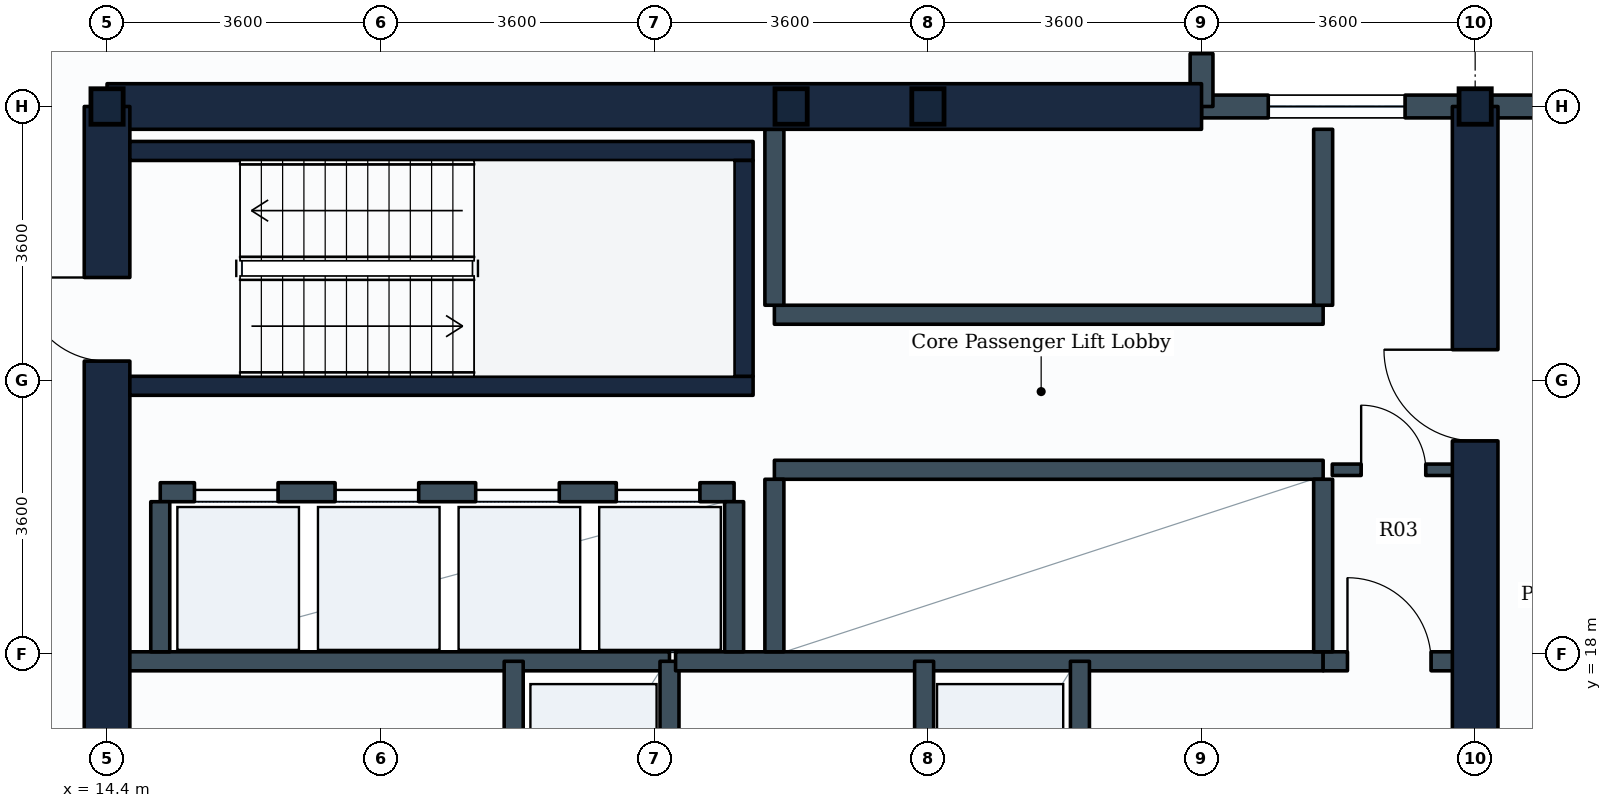
"""IFC4 building model, lengths in metres.
Left out: names, types, materials, properties, quantities, classifications, styles, units other than length and angle.
Written with IfcOpenShell. Run it as: python <this file> out.ifc"""

import sys

from ifc_helpers import new_model, si_unit, direction, frame, frame_2d, origin, origin_2d, place, context, subcontext, project, spatial, rectangle, i_section, extrude, element, fill, save


model = new_model("IFC4")
c1 = context("Model", 3, precision=1e-05, world=origin(), true_north=direction((0.0, 1.0)))
c2 = subcontext(c1, "Body", "Model", "MODEL_VIEW")
j1 = project(units=[si_unit("LENGTHUNIT", "METRE"), si_unit("PLANEANGLEUNIT", "RADIAN")], contexts=[c1])
p1 = place(None, origin())
s1 = spatial("IfcSite", under=j1, at=p1, CompositionType="ELEMENT")
p2 = place(p1, origin())
s2 = spatial("IfcBuilding", under=s1, at=p2, CompositionType="ELEMENT")
p3 = place(p2, frame((0.0, 0.0, 70.8)))
s3 = spatial("IfcBuildingStorey", under=s2, at=p3, CompositionType="ELEMENT", Elevation=70.8)
for number, where, z_axis, x_axis in (
    (1, (14.4, 25.2, 0.0), (0.0, 0.0, 1.0), (1.0, 0.0, 0.0)),
    (2, (23.4, 25.2, 0.0), (0.0, 0.0, 1.0), (1.0, 0.0, 0.0)),
    (3, (25.2, 25.2, 0.0), (0.0, 0.0, 1.0), (1.0, 0.0, 0.0)),
    (4, (32.4, 25.2, 0.0), (0.0, 0.0, 1.0), (1.0, 0.0, 0.0)),
):
    element("IfcColumn", number, at=place(p3, frame(where, z_axis=z_axis, x_axis=x_axis)), inside=s3, PredefinedType="COLUMN", context=c2, shape_type="SweptSolid", body=[
        extrude(i_section(OverallWidth=0.424, OverallDepth=0.467, WebThickness=0.033, FlangeThickness=0.053, FilletRadius=0.015, at=origin_2d()), origin(), (0.0, 0.0, 1.0), 3.9),
    ])
p4 = place(p3, frame((32.4, 25.2, 0.0), z_axis=(0.0, 0.0, 1.0), x_axis=(1.0, 0.0, 0.0)))
e5 = element("IfcWall", 5, at=p4, inside=s3, PredefinedType="STANDARD", context=c2, shape_type="SweptSolid", body=[
    extrude(rectangle(XDim=3.6, YDim=0.3, at=frame_2d((1.8, 0.0))), origin(), (0.0, 0.0, 1.0), 2.93),
])
p5 = place(p3, frame((28.8, 25.2, 0.0), z_axis=(0.0, 0.0, 1.0), x_axis=(1.0, 0.0, 0.0)))
e6 = element("IfcWall", 6, at=p5, inside=s3, PredefinedType="STANDARD", context=c2, shape_type="SweptSolid", body=[
    extrude(rectangle(XDim=3.6, YDim=0.3, at=frame_2d((1.8, 0.0))), origin(), (0.0, 0.0, 1.0), 3.565),
])
p6 = place(p5, frame((0.878, 0.0, 0.85)))
e7 = element("IfcOpeningElement", 7, at=p6, cuts=e6, PredefinedType="OPENING", context=c2, shape_type="SweptSolid", body=[
    extrude(rectangle(XDim=1.8, YDim=1.35, at=frame_2d((0.9, 0.675))), frame((0.0, 0.16, 0.0), z_axis=(0.0, -1.0, 0.0), x_axis=(1.0, 0.0, 0.0)), (0.0, 0.0, 1.0), 0.32),
])
p7 = place(p3, frame((28.8, 25.2, 0.0), z_axis=(0.0, 0.0, 1.0), x_axis=(0.0, 1.0, 0.0)))
e8 = element("IfcWall", 8, at=p7, inside=s3, PredefinedType="STANDARD", context=c2, shape_type="SweptSolid", body=[
    extrude(rectangle(XDim=3.6, YDim=0.3, at=frame_2d((1.8, 0.0))), origin(), (0.0, 0.0, 1.0), 3.07),
])
p8 = place(p7, frame((0.695, 0.0, 0.85)))
e9 = element("IfcOpeningElement", 9, at=p8, cuts=e8, PredefinedType="OPENING", context=c2, shape_type="SweptSolid", body=[
    extrude(rectangle(XDim=1.8, YDim=1.35, at=frame_2d((0.9, 0.675))), frame((0.0, 0.16, 0.0), z_axis=(0.0, -1.0, 0.0), x_axis=(1.0, 0.0, 0.0)), (0.0, 0.0, 1.0), 0.32),
])
p9 = place(p3, frame((14.4, 25.2, 0.0), z_axis=(0.0, 0.0, 1.0), x_axis=(1.0, 0.0, 0.0)))
e10 = element("IfcWall", 10, at=p9, inside=s3, PredefinedType="SHEAR", context=c2, shape_type="SweptSolid", body=[
    extrude(rectangle(XDim=14.4, YDim=0.6, at=frame_2d((7.2, 0.0))), origin(), (0.0, 0.0, 1.0), 3.58),
])
p10 = place(p3, frame((14.4, 10.8, 0.0), z_axis=(0.0, 0.0, 1.0), x_axis=(0.0, 1.0, 0.0)))
e11 = element("IfcWall", 11, at=p10, inside=s3, PredefinedType="SHEAR", context=c2, shape_type="SweptSolid", body=[
    extrude(rectangle(XDim=14.4, YDim=0.6, at=frame_2d((7.2, 0.0))), origin(), (0.0, 0.0, 1.0), 3.58),
])
p11 = place(p10, frame((11.05, 0.0, 0.0)))
e12 = element("IfcOpeningElement", 12, at=p11, cuts=e11, PredefinedType="OPENING", context=c2, shape_type="SweptSolid", body=[
    extrude(rectangle(XDim=1.1, YDim=2.1, at=frame_2d((0.55, 1.05))), frame((0.0, 0.31, 0.0), z_axis=(0.0, -1.0, 0.0), x_axis=(1.0, 0.0, 0.0)), (0.0, 0.0, 1.0), 0.62),
])
p12 = place(p10, frame((4.9, 0.0, 0.0)))
e13 = element("IfcOpeningElement", 13, at=p12, cuts=e11, PredefinedType="OPENING", context=c2, shape_type="SweptSolid", body=[
    extrude(rectangle(XDim=1.2, YDim=2.1, at=frame_2d((0.6, 1.05))), frame((0.0, 0.31, 0.0), z_axis=(0.0, -1.0, 0.0), x_axis=(1.0, 0.0, 0.0)), (0.0, 0.0, 1.0), 0.62),
])
p13 = place(p3, frame((32.4, 10.8, 0.0), z_axis=(0.0, 0.0, 1.0), x_axis=(0.0, 1.0, 0.0)))
e14 = element("IfcWall", 14, at=p13, inside=s3, PredefinedType="SHEAR", context=c2, shape_type="SweptSolid", body=[
    extrude(rectangle(XDim=14.4, YDim=0.6, at=frame_2d((7.2, 0.0))), origin(), (0.0, 0.0, 1.0), 3.58),
])
p14 = place(p13, frame((4.35, 0.0, 0.0)))
e15 = element("IfcOpeningElement", 15, at=p14, cuts=e14, PredefinedType="OPENING", context=c2, shape_type="SweptSolid", body=[
    extrude(rectangle(XDim=1.2, YDim=2.1, at=frame_2d((0.6, 1.05))), frame((0.0, 0.31, 0.0), z_axis=(0.0, -1.0, 0.0), x_axis=(1.0, 0.0, 0.0)), (0.0, 0.0, 1.0), 0.62),
])
p15 = place(p13, frame((10.0, 0.0, 0.0)))
e16 = element("IfcOpeningElement", 16, at=p15, cuts=e14, PredefinedType="OPENING", context=c2, shape_type="SweptSolid", body=[
    extrude(rectangle(XDim=1.2, YDim=2.1, at=frame_2d((0.6, 1.05))), frame((0.0, 0.31, 0.0), z_axis=(0.0, -1.0, 0.0), x_axis=(1.0, 0.0, 0.0)), (0.0, 0.0, 1.0), 0.62),
])
for number, where, z_axis, x_axis in (
    (17, (14.7, 21.525, 0.0), (0.0, 0.0, 1.0), (1.0, 0.0, 0.0)),
    (18, (14.7, 24.615, 0.0), (0.0, 0.0, 1.0), (1.0, 0.0, 0.0)),
):
    element("IfcWall", number, at=place(p3, frame(where, z_axis=z_axis, x_axis=x_axis)), inside=s3, PredefinedType="SHEAR", context=c2, shape_type="SweptSolid", body=[
        extrude(rectangle(XDim=8.2, YDim=0.25, at=frame_2d((4.1, 0.0))), origin(), (0.0, 0.0, 1.0), 3.58),
    ])
p16 = place(p3, frame((22.775, 21.65, 0.0), z_axis=(0.0, 0.0, 1.0), x_axis=(0.0, 1.0, 0.0)))
e19 = element("IfcWall", 19, at=p16, inside=s3, PredefinedType="SHEAR", context=c2, shape_type="SweptSolid", body=[
    extrude(rectangle(XDim=2.84, YDim=0.25, at=frame_2d((1.42, 0.0))), origin(), (0.0, 0.0, 1.0), 3.58),
])
p17 = place(p3, frame((14.65, 17.9, 0.0), z_axis=(0.0, 0.0, 1.0), x_axis=(1.0, 0.0, 0.0)))
e20 = element("IfcWall", 20, at=p17, inside=s3, PredefinedType="PARTITIONING", context=c2, shape_type="SweptSolid", body=[
    extrude(rectangle(XDim=7.15, YDim=0.25, at=frame_2d((3.575, 0.0))), origin(), (0.0, 0.0, 1.0), 3.565),
])
p18 = place(p3, frame((19.75, 14.84, 0.0), z_axis=(0.0, 0.0, 1.0), x_axis=(0.0, 1.0, 0.0)))
e21 = element("IfcWall", 21, at=p18, inside=s3, PredefinedType="PARTITIONING", context=c2, shape_type="SweptSolid", body=[
    extrude(rectangle(XDim=3.06, YDim=0.25, at=frame_2d((1.53, 0.0))), origin(), (0.0, 0.0, 1.0), 3.565),
])
p19 = place(p18, frame((0.98, 0.0, 0.0)))
e22 = element("IfcOpeningElement", 22, at=p19, cuts=e21, PredefinedType="OPENING", context=c2, shape_type="SweptSolid", body=[
    extrude(rectangle(XDim=1.1, YDim=2.1, at=frame_2d((0.55, 1.05))), frame((0.0, 0.135, 0.0), z_axis=(0.0, -1.0, 0.0), x_axis=(1.0, 0.0, 0.0)), (0.0, 0.0, 1.0), 0.27),
])
p20 = place(p3, frame((21.8, 14.84, 0.0), z_axis=(0.0, 0.0, 1.0), x_axis=(0.0, 1.0, 0.0)))
e23 = element("IfcWall", 23, at=p20, inside=s3, PredefinedType="PARTITIONING", context=c2, shape_type="SweptSolid", body=[
    extrude(rectangle(XDim=3.06, YDim=0.25, at=frame_2d((1.53, 0.0))), origin(), (0.0, 0.0, 1.0), 3.565),
])
p21 = place(p3, frame((21.88, 17.9, 0.0), z_axis=(0.0, 0.0, 1.0), x_axis=(1.0, 0.0, 0.0)))
e24 = element("IfcWall", 24, at=p21, inside=s3, PredefinedType="PARTITIONING", context=c2, shape_type="SweptSolid", body=[
    extrude(rectangle(XDim=8.52, YDim=0.25, at=frame_2d((4.26, 0.0))), origin(), (0.0, 0.0, 1.0), 3.565),
])
p22 = place(p3, frame((30.4, 17.9, 0.0), z_axis=(0.0, 0.0, 1.0), x_axis=(1.0, 0.0, 0.0)))
e25 = element("IfcWall", 25, at=p22, inside=s3, PredefinedType="PARTITIONING", context=c2, shape_type="SweptSolid", body=[
    extrude(rectangle(XDim=1.75, YDim=0.25, at=frame_2d((0.875, 0.0))), origin(), (0.0, 0.0, 1.0), 3.565),
])
p23 = place(p22, frame((0.32, 0.0, 0.0)))
e26 = element("IfcOpeningElement", 26, at=p23, cuts=e25, PredefinedType="OPENING", context=c2, shape_type="SweptSolid", body=[
    extrude(rectangle(XDim=1.1, YDim=2.1, at=frame_2d((0.55, 1.05))), frame((0.0, 0.135, 0.0), z_axis=(0.0, -1.0, 0.0), x_axis=(1.0, 0.0, 0.0)), (0.0, 0.0, 1.0), 0.27),
])
p24 = place(p3, frame((25.15, 14.84, 0.0), z_axis=(0.0, 0.0, 1.0), x_axis=(0.0, 1.0, 0.0)))
e27 = element("IfcWall", 27, at=p24, inside=s3, PredefinedType="PARTITIONING", context=c2, shape_type="SweptSolid", body=[
    extrude(rectangle(XDim=3.06, YDim=0.25, at=frame_2d((1.53, 0.0))), origin(), (0.0, 0.0, 1.0), 3.565),
])
p25 = place(p3, frame((27.2, 14.84, 0.0), z_axis=(0.0, 0.0, 1.0), x_axis=(0.0, 1.0, 0.0)))
e28 = element("IfcWall", 28, at=p25, inside=s3, PredefinedType="PARTITIONING", context=c2, shape_type="SweptSolid", body=[
    extrude(rectangle(XDim=3.06, YDim=0.25, at=frame_2d((1.53, 0.0))), origin(), (0.0, 0.0, 1.0), 3.565),
])
p26 = place(p25, frame((0.98, 0.0, 0.0)))
e29 = element("IfcOpeningElement", 29, at=p26, cuts=e28, PredefinedType="OPENING", context=c2, shape_type="SweptSolid", body=[
    extrude(rectangle(XDim=1.1, YDim=2.1, at=frame_2d((0.55, 1.05))), frame((0.0, 0.135, 0.0), z_axis=(0.0, -1.0, 0.0), x_axis=(1.0, 0.0, 0.0)), (0.0, 0.0, 1.0), 0.27),
])
p27 = place(p3, frame((15.1, 20.125, 0.0), z_axis=(0.0, 0.0, 1.0), x_axis=(1.0, 0.0, 0.0)))
e30 = element("IfcWall", 30, at=p27, inside=s3, PredefinedType="PARTITIONING", context=c2, shape_type="SweptSolid", body=[
    extrude(rectangle(XDim=7.55, YDim=0.25, at=frame_2d((3.775, 0.0))), origin(), (0.0, 0.0, 1.0), 3.565),
])
p28 = place(p27, frame((0.45, 0.0, 0.0)))
e31 = element("IfcOpeningElement", 31, at=p28, cuts=e30, PredefinedType="OPENING", context=c2, shape_type="SweptSolid", body=[
    extrude(rectangle(XDim=1.1, YDim=2.1, at=frame_2d((0.55, 1.05))), frame((0.0, 0.135, 0.0), z_axis=(0.0, -1.0, 0.0), x_axis=(1.0, 0.0, 0.0)), (0.0, 0.0, 1.0), 0.27),
])
p29 = place(p27, frame((2.3, 0.0, 0.0)))
e32 = element("IfcOpeningElement", 32, at=p29, cuts=e30, PredefinedType="OPENING", context=c2, shape_type="SweptSolid", body=[
    extrude(rectangle(XDim=1.1, YDim=2.1, at=frame_2d((0.55, 1.05))), frame((0.0, 0.135, 0.0), z_axis=(0.0, -1.0, 0.0), x_axis=(1.0, 0.0, 0.0)), (0.0, 0.0, 1.0), 0.27),
])
p30 = place(p27, frame((4.15, 0.0, 0.0)))
e33 = element("IfcOpeningElement", 33, at=p30, cuts=e30, PredefinedType="OPENING", context=c2, shape_type="SweptSolid", body=[
    extrude(rectangle(XDim=1.1, YDim=2.1, at=frame_2d((0.55, 1.05))), frame((0.0, 0.135, 0.0), z_axis=(0.0, -1.0, 0.0), x_axis=(1.0, 0.0, 0.0)), (0.0, 0.0, 1.0), 0.27),
])
p31 = place(p27, frame((6.0, 0.0, 0.0)))
e34 = element("IfcOpeningElement", 34, at=p31, cuts=e30, PredefinedType="OPENING", context=c2, shape_type="SweptSolid", body=[
    extrude(rectangle(XDim=1.1, YDim=2.1, at=frame_2d((0.55, 1.05))), frame((0.0, 0.135, 0.0), z_axis=(0.0, -1.0, 0.0), x_axis=(1.0, 0.0, 0.0)), (0.0, 0.0, 1.0), 0.27),
])
for number, where, z_axis, x_axis in (
    (35, (15.1, 18.025, 0.0), (0.0, 0.0, 1.0), (0.0, 1.0, 0.0)),
    (36, (22.65, 18.025, 0.0), (0.0, 0.0, 1.0), (0.0, 1.0, 0.0)),
):
    element("IfcWall", number, at=place(p3, frame(where, z_axis=z_axis, x_axis=x_axis)), inside=s3, PredefinedType="PARTITIONING", context=c2, shape_type="SweptSolid", body=[
        extrude(rectangle(XDim=1.975, YDim=0.25, at=frame_2d((0.988, 0.0))), origin(), (0.0, 0.0, 1.0), 3.565),
    ])
p32 = place(p3, frame((23.18, 20.42, 0.0), z_axis=(0.0, 0.0, 1.0), x_axis=(1.0, 0.0, 0.0)))
e37 = element("IfcWall", 37, at=p32, inside=s3, PredefinedType="PARTITIONING", context=c2, shape_type="SweptSolid", body=[
    extrude(rectangle(XDim=7.22, YDim=0.25, at=frame_2d((3.61, 0.0))), origin(), (0.0, 0.0, 1.0), 3.565),
])
for number, where, z_axis, x_axis in (
    (38, (23.18, 18.025, 0.0), (0.0, 0.0, 1.0), (0.0, 1.0, 0.0)),
    (39, (30.4, 18.025, 0.0), (0.0, 0.0, 1.0), (0.0, 1.0, 0.0)),
):
    element("IfcWall", number, at=place(p3, frame(where, z_axis=z_axis, x_axis=x_axis)), inside=s3, PredefinedType="PARTITIONING", context=c2, shape_type="SweptSolid", body=[
        extrude(rectangle(XDim=2.27, YDim=0.25, at=frame_2d((1.135, 0.0))), origin(), (0.0, 0.0, 1.0), 3.565),
    ])
p33 = place(p3, frame((23.18, 22.46, 0.0), z_axis=(0.0, 0.0, 1.0), x_axis=(1.0, 0.0, 0.0)))
e40 = element("IfcWall", 40, at=p33, inside=s3, PredefinedType="PARTITIONING", context=c2, shape_type="SweptSolid", body=[
    extrude(rectangle(XDim=7.22, YDim=0.25, at=frame_2d((3.61, 0.0))), origin(), (0.0, 0.0, 1.0), 3.565),
])
for number, where, z_axis, x_axis in (
    (41, (23.18, 22.585, 0.0), (0.0, 0.0, 1.0), (0.0, 1.0, 0.0)),
    (42, (30.4, 22.585, 0.0), (0.0, 0.0, 1.0), (0.0, 1.0, 0.0)),
):
    element("IfcWall", number, at=place(p3, frame(where, z_axis=z_axis, x_axis=x_axis)), inside=s3, PredefinedType="PARTITIONING", context=c2, shape_type="SweptSolid", body=[
        extrude(rectangle(XDim=2.315, YDim=0.25, at=frame_2d((1.157, 0.0))), origin(), (0.0, 0.0, 1.0), 3.565),
    ])
p34 = place(p3, frame((30.52, 20.42, 0.0), z_axis=(0.0, 0.0, 1.0), x_axis=(1.0, 0.0, 0.0)))
e43 = element("IfcWall", 43, at=p34, inside=s3, PredefinedType="PARTITIONING", context=c2, shape_type="SweptSolid", body=[
    extrude(rectangle(XDim=1.63, YDim=0.15, at=frame_2d((0.815, 0.0))), origin(), (0.0, 0.0, 1.0), 3.565),
])
p35 = place(p34, frame((0.38, 0.0, 0.0)))
e44 = element("IfcOpeningElement", 44, at=p35, cuts=e43, PredefinedType="OPENING", context=c2, shape_type="SweptSolid", body=[
    extrude(rectangle(XDim=0.85, YDim=2.1, at=frame_2d((0.425, 1.05))), frame((0.0, 0.085, 0.0), z_axis=(0.0, -1.0, 0.0), x_axis=(1.0, 0.0, 0.0)), (0.0, 0.0, 1.0), 0.17),
])
p36 = place(p6, origin())
e45 = element("IfcWindow", 45, at=p36, inside=s3, PartitioningType="SINGLE_PANEL", PredefinedType="WINDOW", context=c2, shape_type="SweptSolid", body=[
    extrude(rectangle(XDim=1.8, YDim=1.35, at=frame_2d((0.9, 0.675))), frame((0.0, 0.03, 0.0), z_axis=(0.0, -1.0, 0.0), x_axis=(1.0, 0.0, 0.0)), (0.0, 0.0, 1.0), 0.06),
])
fill(e7, e45)
p37 = place(p8, origin())
e46 = element("IfcWindow", 46, at=p37, inside=s3, PartitioningType="SINGLE_PANEL", PredefinedType="WINDOW", context=c2, shape_type="SweptSolid", body=[
    extrude(rectangle(XDim=1.8, YDim=1.35, at=frame_2d((0.9, 0.675))), frame((0.0, 0.03, 0.0), z_axis=(0.0, -1.0, 0.0), x_axis=(1.0, 0.0, 0.0)), (0.0, 0.0, 1.0), 0.06),
])
fill(e9, e46)
p38 = place(p11, origin())
e47 = element("IfcDoor", 47, at=p38, inside=s3, OperationType="SINGLE_SWING_RIGHT", PredefinedType="DOOR", context=c2, shape_type="SweptSolid", body=[
    extrude(rectangle(XDim=1.1, YDim=2.1, at=frame_2d((0.55, 1.05))), frame((0.0, 0.025, 0.0), z_axis=(0.0, -1.0, 0.0), x_axis=(1.0, 0.0, 0.0)), (0.0, 0.0, 1.0), 0.05),
])
fill(e12, e47)
p39 = place(p23, origin())
e48 = element("IfcDoor", 48, at=p39, inside=s3, OperationType="SINGLE_SWING_LEFT", PredefinedType="DOOR", context=c2, shape_type="SweptSolid", body=[
    extrude(rectangle(XDim=1.1, YDim=2.1, at=frame_2d((0.55, 1.05))), frame((0.0, 0.025, 0.0), z_axis=(0.0, -1.0, 0.0), x_axis=(1.0, 0.0, 0.0)), (0.0, 0.0, 1.0), 0.05),
])
fill(e26, e48)
p40 = place(p28, origin())
e49 = element("IfcDoor", 49, at=p40, inside=s3, OperationType="SLIDING_TO_LEFT", PredefinedType="DOOR", context=c2, shape_type="SweptSolid", body=[
    extrude(rectangle(XDim=1.1, YDim=2.1, at=frame_2d((0.55, 1.05))), frame((0.0, 0.025, 0.0), z_axis=(0.0, -1.0, 0.0), x_axis=(1.0, 0.0, 0.0)), (0.0, 0.0, 1.0), 0.05),
])
fill(e31, e49)
p41 = place(p29, origin())
e50 = element("IfcDoor", 50, at=p41, inside=s3, OperationType="SLIDING_TO_LEFT", PredefinedType="DOOR", context=c2, shape_type="SweptSolid", body=[
    extrude(rectangle(XDim=1.1, YDim=2.1, at=frame_2d((0.55, 1.05))), frame((0.0, 0.025, 0.0), z_axis=(0.0, -1.0, 0.0), x_axis=(1.0, 0.0, 0.0)), (0.0, 0.0, 1.0), 0.05),
])
fill(e32, e50)
p42 = place(p30, origin())
e51 = element("IfcDoor", 51, at=p42, inside=s3, OperationType="SLIDING_TO_LEFT", PredefinedType="DOOR", context=c2, shape_type="SweptSolid", body=[
    extrude(rectangle(XDim=1.1, YDim=2.1, at=frame_2d((0.55, 1.05))), frame((0.0, 0.025, 0.0), z_axis=(0.0, -1.0, 0.0), x_axis=(1.0, 0.0, 0.0)), (0.0, 0.0, 1.0), 0.05),
])
fill(e33, e51)
p43 = place(p31, origin())
e52 = element("IfcDoor", 52, at=p43, inside=s3, OperationType="SLIDING_TO_LEFT", PredefinedType="DOOR", context=c2, shape_type="SweptSolid", body=[
    extrude(rectangle(XDim=1.1, YDim=2.1, at=frame_2d((0.55, 1.05))), frame((0.0, 0.025, 0.0), z_axis=(0.0, -1.0, 0.0), x_axis=(1.0, 0.0, 0.0)), (0.0, 0.0, 1.0), 0.05),
])
fill(e34, e52)
p44 = place(p15, origin())
e53 = element("IfcDoor", 53, at=p44, inside=s3, OperationType="SINGLE_SWING_RIGHT", PredefinedType="DOOR", context=c2, shape_type="SweptSolid", body=[
    extrude(rectangle(XDim=1.2, YDim=2.1, at=frame_2d((0.6, 1.05))), frame((0.0, 0.025, 0.0), z_axis=(0.0, -1.0, 0.0), x_axis=(1.0, 0.0, 0.0)), (0.0, 0.0, 1.0), 0.05),
])
fill(e16, e53)
p45 = place(p35, origin())
e54 = element("IfcDoor", 54, at=p45, inside=s3, OperationType="SINGLE_SWING_LEFT", PredefinedType="DOOR", context=c2, shape_type="SweptSolid", body=[
    extrude(rectangle(XDim=0.85, YDim=2.1, at=frame_2d((0.425, 1.05))), frame((0.0, 0.025, 0.0), z_axis=(0.0, -1.0, 0.0), x_axis=(1.0, 0.0, 0.0)), (0.0, 0.0, 1.0), 0.05),
])
fill(e44, e54)
save(model, sys.argv[1])
